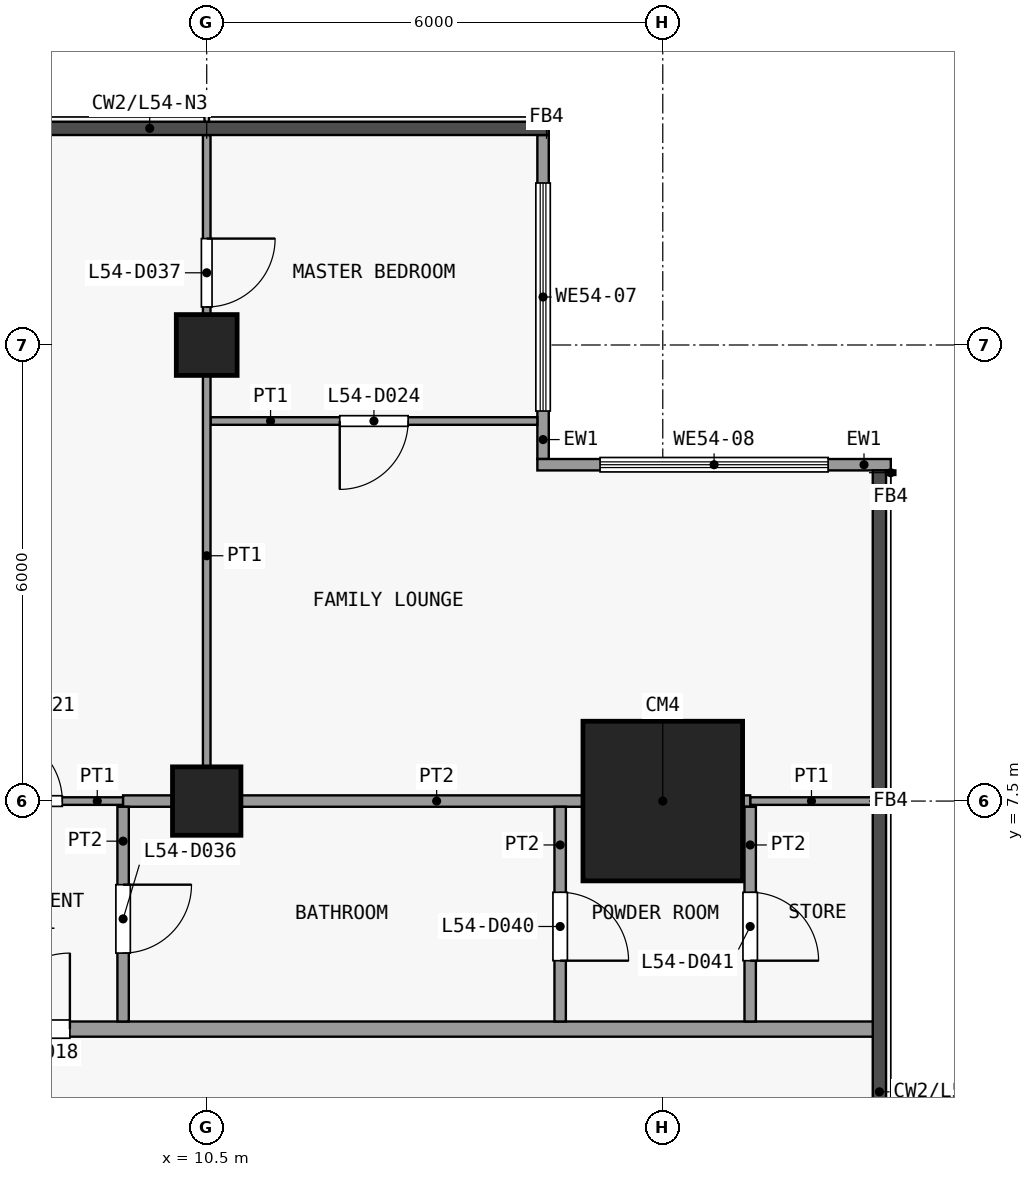
"""IFC4 building model, lengths in metres.
Left out: names, types, materials, properties, quantities, classifications, styles, units other than length and angle.
Written with IfcOpenShell. Run it as: python <this file> out.ifc"""

import sys

from ifc_helpers import new_model, si_unit, direction, frame, frame_2d, origin, origin_2d, place, context, subcontext, project, spatial, rectangle, extrude, element, fill, save


model = new_model("IFC4")
c1 = context("Model", 3, precision=1e-05, world=origin(), true_north=direction((0.0, 1.0)))
c2 = subcontext(c1, "Body", "Model", "MODEL_VIEW")
j1 = project(units=[si_unit("LENGTHUNIT", "METRE"), si_unit("PLANEANGLEUNIT", "RADIAN")], contexts=[c1])
p1 = place(None, origin())
s1 = spatial("IfcSite", under=j1, at=p1, CompositionType="ELEMENT")
p2 = place(p1, origin())
s2 = spatial("IfcBuilding", under=s1, at=p2, CompositionType="ELEMENT")
p3 = place(p2, frame((0.0, 0.0, 215.9)))
s3 = spatial("IfcBuildingStorey", under=s2, at=p3, CompositionType="ELEMENT", Elevation=215.9)
p4 = place(p3, frame((10.5, 7.5, 0.0), z_axis=(0.0, 0.0, 1.0), x_axis=(1.0, 0.0, 0.0)))
e1 = element("IfcColumn", 1, at=p4, inside=s3, PredefinedType="COLUMN", context=c2, shape_type="SweptSolid", body=[
    extrude(rectangle(XDim=0.9, YDim=0.9, at=origin_2d()), origin(), (0.0, 0.0, 1.0), 3.6),
])
p5 = place(p3, frame((10.5, 13.5, 0.0), z_axis=(0.0, 0.0, 1.0), x_axis=(1.0, 0.0, 0.0)))
e2 = element("IfcColumn", 2, at=p5, inside=s3, PredefinedType="COLUMN", context=c2, shape_type="SweptSolid", body=[
    extrude(rectangle(XDim=0.8, YDim=0.8, at=origin_2d()), origin(), (0.0, 0.0, 1.0), 3.6),
])
p6 = place(p3, frame((16.5, 7.5, 0.0), z_axis=(0.0, 0.0, 1.0), x_axis=(1.0, 0.0, 0.0)))
e3 = element("IfcColumn", 3, at=p6, inside=s3, PredefinedType="COLUMN", context=c2, shape_type="SweptSolid", body=[
    extrude(rectangle(XDim=2.1, YDim=2.1, at=origin_2d()), origin(), (0.0, 0.0, 1.0), 3.6),
])
p7 = place(p3, frame((14.925, 16.262, 0.0), z_axis=(0.0, 0.0, 1.0), x_axis=(0.0, -1.0, 0.0)))
e4 = element("IfcWall", 4, at=p7, inside=s3, PredefinedType="SOLIDWALL", context=c2, shape_type="SweptSolid", body=[
    extrude(rectangle(XDim=4.262, YDim=0.15, at=frame_2d((2.131, 0.0))), origin(), (0.0, 0.0, 1.0), 3.3),
])
p8 = place(p7, frame((0.631, 0.0, 0.9)))
e5 = element("IfcOpeningElement", 5, at=p8, cuts=e4, PredefinedType="OPENING", context=c2, shape_type="SweptSolid", body=[
    extrude(rectangle(XDim=3.0, YDim=2.4, at=frame_2d((1.5, 1.2))), frame((0.0, 0.085, 0.0), z_axis=(0.0, -1.0, 0.0), x_axis=(1.0, 0.0, 0.0)), (0.0, 0.0, 1.0), 0.17),
])
p9 = place(p3, frame((14.85, 11.925, 0.0), z_axis=(0.0, 0.0, 1.0), x_axis=(1.0, 0.0, 0.0)))
e6 = element("IfcWall", 6, at=p9, inside=s3, PredefinedType="SOLIDWALL", context=c2, shape_type="SweptSolid", body=[
    extrude(rectangle(XDim=4.65, YDim=0.15, at=frame_2d((2.325, 0.0))), origin(), (0.0, 0.0, 1.0), 3.3),
])
p10 = place(p9, frame((0.825, 0.0, 0.9)))
e7 = element("IfcOpeningElement", 7, at=p10, cuts=e6, PredefinedType="OPENING", context=c2, shape_type="SweptSolid", body=[
    extrude(rectangle(XDim=3.0, YDim=2.4, at=frame_2d((1.5, 1.2))), frame((0.0, 0.085, 0.0), z_axis=(0.0, -1.0, 0.0), x_axis=(1.0, 0.0, 0.0)), (0.0, 0.0, 1.0), 0.17),
])
p11 = place(p3, frame((-19.35, 4.5, 0.0), z_axis=(0.0, 0.0, 1.0), x_axis=(1.0, 0.0, 0.0)))
e8 = element("IfcWall", 8, at=p11, inside=s3, PredefinedType="PARTITIONING", context=c2, shape_type="SweptSolid", body=[
    extrude(rectangle(XDim=38.7, YDim=0.2, at=frame_2d((19.35, 0.0))), origin(), (0.0, 0.0, 1.0), 3.3),
])
p12 = place(p11, frame((4.55, 0.0, 0.0)))
e9 = element("IfcOpeningElement", 9, at=p12, cuts=e8, PredefinedType="OPENING", context=c2, shape_type="SweptSolid", body=[
    extrude(rectangle(XDim=1.0, YDim=2.1, at=frame_2d((0.5, 1.05))), frame((0.0, 0.11, 0.0), z_axis=(0.0, -1.0, 0.0), x_axis=(1.0, 0.0, 0.0)), (0.0, 0.0, 1.0), 0.22),
])
p13 = place(p11, frame((19.55, 0.0, 0.0)))
e10 = element("IfcOpeningElement", 10, at=p13, cuts=e8, PredefinedType="OPENING", context=c2, shape_type="SweptSolid", body=[
    extrude(rectangle(XDim=1.0, YDim=2.1, at=frame_2d((0.5, 1.05))), frame((0.0, 0.11, 0.0), z_axis=(0.0, -1.0, 0.0), x_axis=(1.0, 0.0, 0.0)), (0.0, 0.0, 1.0), 0.22),
])
p14 = place(p11, frame((27.05, 0.0, 0.0)))
e11 = element("IfcOpeningElement", 11, at=p14, cuts=e8, PredefinedType="OPENING", context=c2, shape_type="SweptSolid", body=[
    extrude(rectangle(XDim=1.0, YDim=2.1, at=frame_2d((0.5, 1.05))), frame((0.0, 0.11, 0.0), z_axis=(0.0, -1.0, 0.0), x_axis=(1.0, 0.0, 0.0)), (0.0, 0.0, 1.0), 0.22),
])
p15 = place(p3, frame((7.0, 7.5, 0.0), z_axis=(0.0, 0.0, 1.0), x_axis=(1.0, 0.0, 0.0)))
e12 = element("IfcWall", 12, at=p15, inside=s3, PredefinedType="PARTITIONING", context=c2, shape_type="SweptSolid", body=[
    extrude(rectangle(XDim=2.4, YDim=0.1, at=frame_2d((1.2, 0.0))), origin(), (0.0, 0.0, 1.0), 3.3),
])
p16 = place(p15, frame((0.7, 0.0, 0.0)))
e13 = element("IfcOpeningElement", 13, at=p16, cuts=e12, PredefinedType="OPENING", context=c2, shape_type="SweptSolid", body=[
    extrude(rectangle(XDim=0.9, YDim=2.1, at=frame_2d((0.45, 1.05))), frame((0.0, 0.06, 0.0), z_axis=(0.0, -1.0, 0.0), x_axis=(1.0, 0.0, 0.0)), (0.0, 0.0, 1.0), 0.12),
])
p17 = place(p3, frame((17.65, 7.5, 0.0), z_axis=(0.0, 0.0, 1.0), x_axis=(1.0, 0.0, 0.0)))
e14 = element("IfcWall", 14, at=p17, inside=s3, PredefinedType="PARTITIONING", context=c2, shape_type="SweptSolid", body=[
    extrude(rectangle(XDim=1.613, YDim=0.1, at=frame_2d((0.806, 0.0))), origin(), (0.0, 0.0, 1.0), 3.3),
])
p18 = place(p3, frame((9.4, 7.5, 0.0), z_axis=(0.0, 0.0, 1.0), x_axis=(1.0, 0.0, 0.0)))
e15 = element("IfcWall", 15, at=p18, inside=s3, PredefinedType="PARTITIONING", context=c2, shape_type="SweptSolid", body=[
    extrude(rectangle(XDim=8.25, YDim=0.15, at=frame_2d((4.125, 0.0))), origin(), (0.0, 0.0, 1.0), 3.3),
])
p19 = place(p3, frame((10.55, 12.5, 0.0), z_axis=(0.0, 0.0, 1.0), x_axis=(1.0, 0.0, 0.0)))
e16 = element("IfcWall", 16, at=p19, inside=s3, PredefinedType="PARTITIONING", context=c2, shape_type="SweptSolid", body=[
    extrude(rectangle(XDim=4.3, YDim=0.1, at=frame_2d((2.15, 0.0))), origin(), (0.0, 0.0, 1.0), 3.3),
])
p20 = place(p19, frame((1.7, 0.0, 0.0)))
e17 = element("IfcOpeningElement", 17, at=p20, cuts=e16, PredefinedType="OPENING", context=c2, shape_type="SweptSolid", body=[
    extrude(rectangle(XDim=0.9, YDim=2.1, at=frame_2d((0.45, 1.05))), frame((0.0, 0.06, 0.0), z_axis=(0.0, -1.0, 0.0), x_axis=(1.0, 0.0, 0.0)), (0.0, 0.0, 1.0), 0.12),
])
p21 = place(p3, frame((9.4, 4.6, 0.0), z_axis=(0.0, 0.0, 1.0), x_axis=(0.0, 1.0, 0.0)))
e18 = element("IfcWall", 18, at=p21, inside=s3, PredefinedType="PARTITIONING", context=c2, shape_type="SweptSolid", body=[
    extrude(rectangle(XDim=2.825, YDim=0.15, at=frame_2d((1.413, 0.0))), origin(), (0.0, 0.0, 1.0), 3.3),
])
p22 = place(p21, frame((0.9, 0.0, 0.0)))
e19 = element("IfcOpeningElement", 19, at=p22, cuts=e18, PredefinedType="OPENING", context=c2, shape_type="SweptSolid", body=[
    extrude(rectangle(XDim=0.9, YDim=2.1, at=frame_2d((0.45, 1.05))), frame((0.0, 0.085, 0.0), z_axis=(0.0, -1.0, 0.0), x_axis=(1.0, 0.0, 0.0)), (0.0, 0.0, 1.0), 0.17),
])
p23 = place(p3, frame((10.5, 7.575, 0.0), z_axis=(0.0, 0.0, 1.0), x_axis=(0.0, 1.0, 0.0)))
e20 = element("IfcWall", 20, at=p23, inside=s3, PredefinedType="PARTITIONING", context=c2, shape_type="SweptSolid", body=[
    extrude(rectangle(XDim=8.688, YDim=0.1, at=frame_2d((4.344, 0.0))), origin(), (0.0, 0.0, 1.0), 3.3),
])
p24 = place(p23, frame((6.425, 0.0, 0.0)))
e21 = element("IfcOpeningElement", 21, at=p24, cuts=e20, PredefinedType="OPENING", context=c2, shape_type="SweptSolid", body=[
    extrude(rectangle(XDim=0.9, YDim=2.1, at=frame_2d((0.45, 1.05))), frame((0.0, 0.06, 0.0), z_axis=(0.0, -1.0, 0.0), x_axis=(1.0, 0.0, 0.0)), (0.0, 0.0, 1.0), 0.12),
])
p25 = place(p3, frame((15.15, 4.6, 0.0), z_axis=(0.0, 0.0, 1.0), x_axis=(0.0, 1.0, 0.0)))
e22 = element("IfcWall", 22, at=p25, inside=s3, PredefinedType="PARTITIONING", context=c2, shape_type="SweptSolid", body=[
    extrude(rectangle(XDim=2.825, YDim=0.15, at=frame_2d((1.413, 0.0))), origin(), (0.0, 0.0, 1.0), 3.3),
])
p26 = place(p25, frame((0.8, 0.0, 0.0)))
e23 = element("IfcOpeningElement", 23, at=p26, cuts=e22, PredefinedType="OPENING", context=c2, shape_type="SweptSolid", body=[
    extrude(rectangle(XDim=0.9, YDim=2.1, at=frame_2d((0.45, 1.05))), frame((0.0, 0.085, 0.0), z_axis=(0.0, -1.0, 0.0), x_axis=(1.0, 0.0, 0.0)), (0.0, 0.0, 1.0), 0.17),
])
p27 = place(p3, frame((17.65, 4.6, 0.0), z_axis=(0.0, 0.0, 1.0), x_axis=(0.0, 1.0, 0.0)))
e24 = element("IfcWall", 24, at=p27, inside=s3, PredefinedType="PARTITIONING", context=c2, shape_type="SweptSolid", body=[
    extrude(rectangle(XDim=2.825, YDim=0.15, at=frame_2d((1.413, 0.0))), origin(), (0.0, 0.0, 1.0), 3.3),
])
p28 = place(p27, frame((0.8, 0.0, 0.0)))
e25 = element("IfcOpeningElement", 25, at=p28, cuts=e24, PredefinedType="OPENING", context=c2, shape_type="SweptSolid", body=[
    extrude(rectangle(XDim=0.9, YDim=2.1, at=frame_2d((0.45, 1.05))), frame((0.0, 0.085, 0.0), z_axis=(0.0, -1.0, 0.0), x_axis=(1.0, 0.0, 0.0)), (0.0, 0.0, 1.0), 0.17),
])
p29 = place(p8, origin())
e26 = element("IfcWindow", 26, at=p29, inside=s3, PartitioningType="SINGLE_PANEL", PredefinedType="WINDOW", context=c2, shape_type="SweptSolid", body=[
    extrude(rectangle(XDim=3.0, YDim=2.4, at=frame_2d((1.5, 1.2))), frame((0.0, 0.03, 0.0), z_axis=(0.0, -1.0, 0.0), x_axis=(1.0, 0.0, 0.0)), (0.0, 0.0, 1.0), 0.06),
])
fill(e5, e26)
p30 = place(p10, origin())
e27 = element("IfcWindow", 27, at=p30, inside=s3, PartitioningType="SINGLE_PANEL", PredefinedType="WINDOW", context=c2, shape_type="SweptSolid", body=[
    extrude(rectangle(XDim=3.0, YDim=2.4, at=frame_2d((1.5, 1.2))), frame((0.0, 0.03, 0.0), z_axis=(0.0, -1.0, 0.0), x_axis=(1.0, 0.0, 0.0)), (0.0, 0.0, 1.0), 0.06),
])
fill(e7, e27)
p31 = place(p14, origin())
e28 = element("IfcDoor", 28, at=p31, inside=s3, OperationType="SINGLE_SWING_LEFT", PredefinedType="DOOR", context=c2, shape_type="SweptSolid", body=[
    extrude(rectangle(XDim=1.0, YDim=2.1, at=frame_2d((0.5, 1.05))), frame((0.0, 0.025, 0.0), z_axis=(0.0, -1.0, 0.0), x_axis=(1.0, 0.0, 0.0)), (0.0, 0.0, 1.0), 0.05),
])
fill(e11, e28)
p32 = place(p16, origin())
e29 = element("IfcDoor", 29, at=p32, inside=s3, OperationType="SINGLE_SWING_RIGHT", PredefinedType="DOOR", context=c2, shape_type="SweptSolid", body=[
    extrude(rectangle(XDim=0.9, YDim=2.1, at=frame_2d((0.45, 1.05))), frame((0.0, 0.025, 0.0), z_axis=(0.0, -1.0, 0.0), x_axis=(1.0, 0.0, 0.0)), (0.0, 0.0, 1.0), 0.05),
])
fill(e13, e29)
p33 = place(p20, origin())
e30 = element("IfcDoor", 30, at=p33, inside=s3, OperationType="SINGLE_SWING_LEFT", PredefinedType="DOOR", context=c2, shape_type="SweptSolid", body=[
    extrude(rectangle(XDim=0.9, YDim=2.1, at=frame_2d((0.45, 1.05))), frame((0.0, 0.025, 0.0), z_axis=(0.0, -1.0, 0.0), x_axis=(1.0, 0.0, 0.0)), (0.0, 0.0, 1.0), 0.05),
])
fill(e17, e30)
p34 = place(p22, origin())
e31 = element("IfcDoor", 31, at=p34, inside=s3, OperationType="SINGLE_SWING_RIGHT", PredefinedType="DOOR", context=c2, shape_type="SweptSolid", body=[
    extrude(rectangle(XDim=0.9, YDim=2.1, at=frame_2d((0.45, 1.05))), frame((0.0, 0.025, 0.0), z_axis=(0.0, -1.0, 0.0), x_axis=(1.0, 0.0, 0.0)), (0.0, 0.0, 1.0), 0.05),
])
fill(e19, e31)
p35 = place(p24, origin())
e32 = element("IfcDoor", 32, at=p35, inside=s3, OperationType="SINGLE_SWING_RIGHT", PredefinedType="DOOR", context=c2, shape_type="SweptSolid", body=[
    extrude(rectangle(XDim=0.9, YDim=2.1, at=frame_2d((0.45, 1.05))), frame((0.0, 0.025, 0.0), z_axis=(0.0, -1.0, 0.0), x_axis=(1.0, 0.0, 0.0)), (0.0, 0.0, 1.0), 0.05),
])
fill(e21, e32)
p36 = place(p26, origin())
e33 = element("IfcDoor", 33, at=p36, inside=s3, OperationType="SINGLE_SWING_LEFT", PredefinedType="DOOR", context=c2, shape_type="SweptSolid", body=[
    extrude(rectangle(XDim=0.9, YDim=2.1, at=frame_2d((0.45, 1.05))), frame((0.0, 0.025, 0.0), z_axis=(0.0, -1.0, 0.0), x_axis=(1.0, 0.0, 0.0)), (0.0, 0.0, 1.0), 0.05),
])
fill(e23, e33)
p37 = place(p28, origin())
e34 = element("IfcDoor", 34, at=p37, inside=s3, OperationType="SINGLE_SWING_LEFT", PredefinedType="DOOR", context=c2, shape_type="SweptSolid", body=[
    extrude(rectangle(XDim=0.9, YDim=2.1, at=frame_2d((0.45, 1.05))), frame((0.0, 0.025, 0.0), z_axis=(0.0, -1.0, 0.0), x_axis=(1.0, 0.0, 0.0)), (0.0, 0.0, 1.0), 0.05),
])
fill(e25, e34)
save(model, sys.argv[1])
